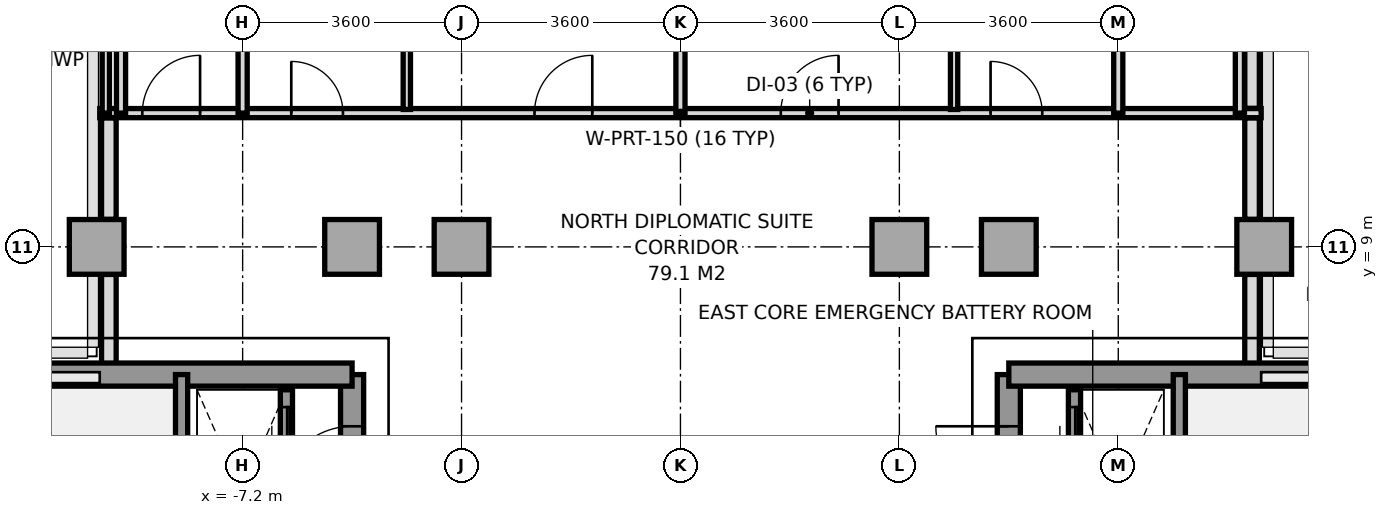
"""IFC4 building model, lengths in metres.
Left out: names, types, materials, properties, quantities, classifications, styles, units other than length and angle.
Written with IfcOpenShell. Run it as: python <this file> out.ifc"""

import sys

from ifc_helpers import new_model, si_unit, direction, frame, frame_2d, origin, origin_2d, place, context, subcontext, project, spatial, rectangle, extrude, source, transform, mapped, element, fill, save


model = new_model("IFC4")
c1 = context("Model", 3, precision=1e-05, world=origin(), true_north=direction((0.0, 1.0)))
c2 = subcontext(c1, "Body", "Model", "MODEL_VIEW")
j1 = project(units=[si_unit("LENGTHUNIT", "METRE"), si_unit("PLANEANGLEUNIT", "RADIAN")], contexts=[c1])
p1 = place(None, origin())
s1 = spatial("IfcSite", under=j1, at=p1, CompositionType="ELEMENT")
p2 = place(p1, origin())
s2 = spatial("IfcBuilding", under=s1, at=p2, CompositionType="ELEMENT")
p3 = place(p2, frame((0.0, 0.0, 194.4)))
s3 = spatial("IfcBuildingStorey", under=s2, at=p3, CompositionType="ELEMENT", Elevation=194.4)
m1 = source(origin(), c2, "Body", "SweptSolid", [
    extrude(rectangle(XDim=0.9, YDim=0.9, at=origin_2d()), origin(), (0.0, 0.0, 1.0), 3.2),
])
for number, where, z_axis, x_axis in (
    (1, (-9.6, 9.0, 0.0), (0.0, 0.0, 1.0), (1.0, 0.0, 0.0)),
    (2, (-5.4, 9.0, 0.0), (0.0, 0.0, 1.0), (1.0, 0.0, 0.0)),
    (3, (-3.6, 9.0, 0.0), (0.0, 0.0, 1.0), (1.0, 0.0, 0.0)),
    (4, (3.6, 9.0, 0.0), (0.0, 0.0, 1.0), (1.0, 0.0, 0.0)),
    (5, (5.4, 9.0, 0.0), (0.0, 0.0, 1.0), (1.0, 0.0, 0.0)),
    (6, (9.6, 9.0, 0.0), (0.0, 0.0, 1.0), (1.0, 0.0, 0.0)),
):
    element("IfcColumn", number, at=place(p3, frame(where, z_axis=z_axis, x_axis=x_axis)), inside=s3, PredefinedType="COLUMN", context=c2, shape_type="MappedRepresentation", body=[
        mapped(m1, transform((0.0, 0.0, 0.0), x_axis=(1.0, 0.0, 0.0), y_axis=(0.0, 1.0, 0.0), z_axis=(0.0, 0.0, 1.0), scale=1.0)),
    ])
p4 = place(p3, frame((-9.4, 6.953, 0.0), z_axis=(0.0, 0.0, 1.0), x_axis=(0.0, 1.0, 0.0)))
e7 = element("IfcWall", 7, at=p4, inside=s3, PredefinedType="PARAPET", context=c2, shape_type="SweptSolid", body=[
    extrude(rectangle(XDim=1.594, YDim=0.24, at=frame_2d((0.797, 0.0))), origin(), (0.0, 0.0, 1.0), 1.15),
])
p5 = place(p3, frame((-9.4, 9.453, 0.0), z_axis=(0.0, 0.0, 1.0), x_axis=(0.0, 1.0, 0.0)))
e8 = element("IfcWall", 8, at=p5, inside=s3, PredefinedType="PARAPET", context=c2, shape_type="SweptSolid", body=[
    extrude(rectangle(XDim=1.669, YDim=0.24, at=frame_2d((0.834, 0.0))), origin(), (0.0, 0.0, 1.0), 1.15),
])
p6 = place(p3, frame((9.4, 15.358, 0.0), z_axis=(0.0, 0.0, 1.0), x_axis=(0.0, -1.0, 0.0)))
e9 = element("IfcWall", 9, at=p6, inside=s3, PredefinedType="PARAPET", context=c2, shape_type="SweptSolid", body=[
    extrude(rectangle(XDim=4.08, YDim=0.24, at=frame_2d((2.04, 0.0))), origin(), (0.0, 0.0, 1.0), 1.15),
])
p7 = place(p3, frame((9.4, 11.122, 0.0), z_axis=(0.0, 0.0, 1.0), x_axis=(0.0, -1.0, 0.0)))
e10 = element("IfcWall", 10, at=p7, inside=s3, PredefinedType="PARAPET", context=c2, shape_type="SweptSolid", body=[
    extrude(rectangle(XDim=1.669, YDim=0.24, at=frame_2d((0.834, 0.0))), origin(), (0.0, 0.0, 1.0), 1.15),
])
p8 = place(p3, frame((9.4, 8.547, 0.0), z_axis=(0.0, 0.0, 1.0), x_axis=(0.0, -1.0, 0.0)))
e11 = element("IfcWall", 11, at=p8, inside=s3, PredefinedType="PARAPET", context=c2, shape_type="SweptSolid", body=[
    extrude(rectangle(XDim=1.594, YDim=0.24, at=frame_2d((0.797, 0.0))), origin(), (0.0, 0.0, 1.0), 1.15),
])
p9 = place(p3, frame((-5.4, -5.6, 0.0), z_axis=(0.0, 0.0, 1.0), x_axis=(0.0, 1.0, 0.0)))
e12 = element("IfcWall", 12, at=p9, inside=s3, PredefinedType="SHEAR", context=c2, shape_type="SweptSolid", body=[
    extrude(rectangle(XDim=12.5, YDim=0.38, at=frame_2d((6.25, 0.0))), origin(), (0.0, 0.0, 1.0), 3.2),
])
p10 = place(p9, frame((4.55, 0.0, 0.0)))
e13 = element("IfcOpeningElement", 13, at=p10, cuts=e12, PredefinedType="OPENING", context=c2, shape_type="SweptSolid", body=[
    extrude(rectangle(XDim=1.2, YDim=2.2, at=frame_2d((0.6, 1.1))), frame((0.0, 0.2, 0.0), z_axis=(0.0, -1.0, 0.0), x_axis=(1.0, 0.0, 0.0)), (0.0, 0.0, 1.0), 0.4),
])
p11 = place(p9, frame((10.45, 0.0, 0.0)))
e14 = element("IfcOpeningElement", 14, at=p11, cuts=e12, PredefinedType="OPENING", context=c2, shape_type="SweptSolid", body=[
    extrude(rectangle(XDim=1.2, YDim=2.2, at=frame_2d((0.6, 1.1))), frame((0.0, 0.2, 0.0), z_axis=(0.0, -1.0, 0.0), x_axis=(1.0, 0.0, 0.0)), (0.0, 0.0, 1.0), 0.4),
])
p12 = place(p3, frame((-11.356, 6.9, 0.0), z_axis=(0.0, 0.0, 1.0), x_axis=(1.0, 0.0, 0.0)))
e15 = element("IfcWall", 15, at=p12, inside=s3, PredefinedType="SHEAR", context=c2, shape_type="SweptSolid", body=[
    extrude(rectangle(XDim=5.956, YDim=0.38, at=frame_2d((2.978, 0.0))), origin(), (0.0, 0.0, 1.0), 3.2),
])
p13 = place(p3, frame((-8.204, -0.016, 0.0), z_axis=(0.0, 0.0, 1.0), x_axis=(0.0, 1.0, 0.0)))
e16 = element("IfcWall", 16, at=p13, inside=s3, PredefinedType="SOLIDWALL", context=c2, shape_type="SweptSolid", body=[
    extrude(rectangle(XDim=6.916, YDim=0.2, at=frame_2d((3.458, 0.0))), origin(), (0.0, 0.0, 1.0), 3.2),
])
p14 = place(p13, frame((0.2, 0.0, 0.0)))
e17 = element("IfcOpeningElement", 17, at=p14, cuts=e16, PredefinedType="OPENING", context=c2, shape_type="SweptSolid", body=[
    extrude(rectangle(XDim=1.2, YDim=2.2, at=frame_2d((0.6, 1.1))), frame((0.0, 0.11, 0.0), z_axis=(0.0, -1.0, 0.0), x_axis=(1.0, 0.0, 0.0)), (0.0, 0.0, 1.0), 0.22),
])
p15 = place(p3, frame((5.4, -5.6, 0.0), z_axis=(0.0, 0.0, 1.0), x_axis=(0.0, 1.0, 0.0)))
e18 = element("IfcWall", 18, at=p15, inside=s3, PredefinedType="SHEAR", context=c2, shape_type="SweptSolid", body=[
    extrude(rectangle(XDim=12.5, YDim=0.38, at=frame_2d((6.25, 0.0))), origin(), (0.0, 0.0, 1.0), 3.2),
])
p16 = place(p15, frame((4.55, 0.0, 0.0)))
e19 = element("IfcOpeningElement", 19, at=p16, cuts=e18, PredefinedType="OPENING", context=c2, shape_type="SweptSolid", body=[
    extrude(rectangle(XDim=1.2, YDim=2.2, at=frame_2d((0.6, 1.1))), frame((0.0, 0.2, 0.0), z_axis=(0.0, -1.0, 0.0), x_axis=(1.0, 0.0, 0.0)), (0.0, 0.0, 1.0), 0.4),
])
p17 = place(p15, frame((10.45, 0.0, 0.0)))
e20 = element("IfcOpeningElement", 20, at=p17, cuts=e18, PredefinedType="OPENING", context=c2, shape_type="SweptSolid", body=[
    extrude(rectangle(XDim=1.2, YDim=2.2, at=frame_2d((0.6, 1.1))), frame((0.0, 0.2, 0.0), z_axis=(0.0, -1.0, 0.0), x_axis=(1.0, 0.0, 0.0)), (0.0, 0.0, 1.0), 0.4),
])
p18 = place(p15, frame((7.88, 0.0, 0.0)))
e21 = element("IfcOpeningElement", 21, at=p18, cuts=e18, PredefinedType="OPENING", context=c2, shape_type="SweptSolid", body=[
    extrude(rectangle(XDim=0.8, YDim=2.1, at=frame_2d((0.4, 1.05))), frame((0.0, 0.2, 0.0), z_axis=(0.0, -1.0, 0.0), x_axis=(1.0, 0.0, 0.0)), (0.0, 0.0, 1.0), 0.4),
])
p19 = place(p3, frame((5.4, 6.9, 0.0), z_axis=(0.0, 0.0, 1.0), x_axis=(1.0, 0.0, 0.0)))
e22 = element("IfcWall", 22, at=p19, inside=s3, PredefinedType="SHEAR", context=c2, shape_type="SweptSolid", body=[
    extrude(rectangle(XDim=5.956, YDim=0.38, at=frame_2d((2.978, 0.0))), origin(), (0.0, 0.0, 1.0), 3.2),
])
p20 = place(p3, frame((8.204, -0.016, 0.0), z_axis=(0.0, 0.0, 1.0), x_axis=(0.0, 1.0, 0.0)))
e23 = element("IfcWall", 23, at=p20, inside=s3, PredefinedType="SOLIDWALL", context=c2, shape_type="SweptSolid", body=[
    extrude(rectangle(XDim=6.916, YDim=0.2, at=frame_2d((3.458, 0.0))), origin(), (0.0, 0.0, 1.0), 3.2),
])
p21 = place(p20, frame((0.2, 0.0, 0.0)))
e24 = element("IfcOpeningElement", 24, at=p21, cuts=e23, PredefinedType="OPENING", context=c2, shape_type="SweptSolid", body=[
    extrude(rectangle(XDim=1.2, YDim=2.2, at=frame_2d((0.6, 1.1))), frame((0.0, 0.11, 0.0), z_axis=(0.0, -1.0, 0.0), x_axis=(1.0, 0.0, 0.0)), (0.0, 0.0, 1.0), 0.22),
])
p22 = place(p3, frame((-6.48, 4.98, 0.0), z_axis=(0.0, 0.0, 1.0), x_axis=(0.0, 1.0, 0.0)))
e25 = element("IfcWall", 25, at=p22, inside=s3, PredefinedType="SOLIDWALL", context=c2, shape_type="SweptSolid", body=[
    extrude(rectangle(XDim=1.67, YDim=0.2, at=frame_2d((0.835, 0.0))), origin(), (0.0, 0.0, 1.0), 3.2),
])
p23 = place(p22, frame((0.285, 0.0, 0.0)))
e26 = element("IfcOpeningElement", 26, at=p23, cuts=e25, PredefinedType="OPENING", context=c2, shape_type="SweptSolid", body=[
    extrude(rectangle(XDim=1.1, YDim=2.2, at=frame_2d((0.55, 1.1))), frame((0.0, 0.11, 0.0), z_axis=(0.0, -1.0, 0.0), x_axis=(1.0, 0.0, 0.0)), (0.0, 0.0, 1.0), 0.22),
])
p24 = place(p3, frame((6.48, 4.98, 0.0), z_axis=(0.0, 0.0, 1.0), x_axis=(0.0, 1.0, 0.0)))
e27 = element("IfcWall", 27, at=p24, inside=s3, PredefinedType="SOLIDWALL", context=c2, shape_type="SweptSolid", body=[
    extrude(rectangle(XDim=1.67, YDim=0.2, at=frame_2d((0.835, 0.0))), origin(), (0.0, 0.0, 1.0), 3.2),
])
p25 = place(p24, frame((0.285, 0.0, 0.0)))
e28 = element("IfcOpeningElement", 28, at=p25, cuts=e27, PredefinedType="OPENING", context=c2, shape_type="SweptSolid", body=[
    extrude(rectangle(XDim=1.1, YDim=2.2, at=frame_2d((0.55, 1.1))), frame((0.0, 0.11, 0.0), z_axis=(0.0, -1.0, 0.0), x_axis=(1.0, 0.0, 0.0)), (0.0, 0.0, 1.0), 0.22),
])
p26 = place(p3, frame((-9.55, 11.2, 0.0), z_axis=(0.0, 0.0, 1.0), x_axis=(1.0, 0.0, 0.0)))
e29 = element("IfcWall", 29, at=p26, inside=s3, PredefinedType="PARTITIONING", context=c2, shape_type="SweptSolid", body=[
    extrude(rectangle(XDim=19.1, YDim=0.15, at=frame_2d((9.55, 0.0))), origin(), (0.0, 0.0, 1.0), 3.2),
])
p27 = place(p26, frame((0.7, 0.0, 0.0)))
e30 = element("IfcOpeningElement", 30, at=p27, cuts=e29, PredefinedType="OPENING", context=c2, shape_type="SweptSolid", body=[
    extrude(rectangle(XDim=0.95, YDim=2.15, at=frame_2d((0.475, 1.075))), frame((0.0, 0.085, 0.0), z_axis=(0.0, -1.0, 0.0), x_axis=(1.0, 0.0, 0.0)), (0.0, 0.0, 1.0), 0.17),
])
p28 = place(p26, frame((3.15, 0.0, 0.0)))
e31 = element("IfcOpeningElement", 31, at=p28, cuts=e29, PredefinedType="OPENING", context=c2, shape_type="SweptSolid", body=[
    extrude(rectangle(XDim=0.85, YDim=2.1, at=frame_2d((0.425, 1.05))), frame((0.0, 0.085, 0.0), z_axis=(0.0, -1.0, 0.0), x_axis=(1.0, 0.0, 0.0)), (0.0, 0.0, 1.0), 0.17),
])
p29 = place(p26, frame((7.15, 0.0, 0.0)))
e32 = element("IfcOpeningElement", 32, at=p29, cuts=e29, PredefinedType="OPENING", context=c2, shape_type="SweptSolid", body=[
    extrude(rectangle(XDim=0.95, YDim=2.15, at=frame_2d((0.475, 1.075))), frame((0.0, 0.085, 0.0), z_axis=(0.0, -1.0, 0.0), x_axis=(1.0, 0.0, 0.0)), (0.0, 0.0, 1.0), 0.17),
])
p30 = place(p26, frame((14.65, 0.0, 0.0)))
e33 = element("IfcOpeningElement", 33, at=p30, cuts=e29, PredefinedType="OPENING", context=c2, shape_type="SweptSolid", body=[
    extrude(rectangle(XDim=0.85, YDim=2.1, at=frame_2d((0.425, 1.05))), frame((0.0, 0.085, 0.0), z_axis=(0.0, -1.0, 0.0), x_axis=(1.0, 0.0, 0.0)), (0.0, 0.0, 1.0), 0.17),
])
p31 = place(p26, frame((11.2, 0.0, 0.0)))
e34 = element("IfcOpeningElement", 34, at=p31, cuts=e29, PredefinedType="OPENING", context=c2, shape_type="SweptSolid", body=[
    extrude(rectangle(XDim=0.95, YDim=2.15, at=frame_2d((0.475, 1.075))), frame((0.0, 0.085, 0.0), z_axis=(0.0, -1.0, 0.0), x_axis=(1.0, 0.0, 0.0)), (0.0, 0.0, 1.0), 0.17),
])
for number, where, z_axis, x_axis in (
    (35, (-9.2, 11.2, 0.0), (0.0, 0.0, 1.0), (0.0, 1.0, 0.0)),
    (36, (9.2, 11.2, 0.0), (0.0, 0.0, 1.0), (0.0, 1.0, 0.0)),
):
    element("IfcWall", number, at=place(p3, frame(where, z_axis=z_axis, x_axis=x_axis)), inside=s3, PredefinedType="PARTITIONING", context=c2, shape_type="SweptSolid", body=[
        extrude(rectangle(XDim=4.48, YDim=0.15, at=frame_2d((2.24, 0.0))), origin(), (0.0, 0.0, 1.0), 3.2),
    ])
p32 = place(p3, frame((-7.2, 11.2, 0.0), z_axis=(0.0, 0.0, 1.0), x_axis=(0.0, 1.0, 0.0)))
e37 = element("IfcWall", 37, at=p32, inside=s3, PredefinedType="PARTITIONING", context=c2, shape_type="SweptSolid", body=[
    extrude(rectangle(XDim=12.2, YDim=0.15, at=frame_2d((6.1, 0.0))), origin(), (0.0, 0.0, 1.0), 2.75),
])
p33 = place(p3, frame((0.0, 11.2, 0.0), z_axis=(0.0, 0.0, 1.0), x_axis=(0.0, 1.0, 0.0)))
e38 = element("IfcWall", 38, at=p33, inside=s3, PredefinedType="PARTITIONING", context=c2, shape_type="SweptSolid", body=[
    extrude(rectangle(XDim=13.45, YDim=0.15, at=frame_2d((6.725, 0.0))), origin(), (0.0, 0.0, 1.0), 2.75),
])
p34 = place(p3, frame((7.2, 11.2, 0.0), z_axis=(0.0, 0.0, 1.0), x_axis=(0.0, 1.0, 0.0)))
e39 = element("IfcWall", 39, at=p34, inside=s3, PredefinedType="PARTITIONING", context=c2, shape_type="SweptSolid", body=[
    extrude(rectangle(XDim=12.2, YDim=0.15, at=frame_2d((6.1, 0.0))), origin(), (0.0, 0.0, 1.0), 2.75),
])
p35 = place(p3, frame((-9.45, 11.2, 0.0), z_axis=(0.0, 0.0, 1.0), x_axis=(0.0, 1.0, 0.0)))
e40 = element("IfcWall", 40, at=p35, inside=s3, PredefinedType="PARTITIONING", context=c2, shape_type="SweptSolid", body=[
    extrude(rectangle(XDim=3.6, YDim=0.12, at=frame_2d((1.8, 0.0))), origin(), (0.0, 0.0, 1.0), 3.2),
])
for number, where, z_axis, x_axis in (
    (41, (-4.5, 11.26, 0.0), (0.0, 0.0, 1.0), (0.0, 1.0, 0.0)),
    (42, (4.5, 11.26, 0.0), (0.0, 0.0, 1.0), (0.0, 1.0, 0.0)),
):
    element("IfcWall", number, at=place(p3, frame(where, z_axis=z_axis, x_axis=x_axis)), inside=s3, PredefinedType="PARTITIONING", context=c2, shape_type="SweptSolid", body=[
        extrude(rectangle(XDim=3.1, YDim=0.12, at=frame_2d((1.55, 0.0))), origin(), (0.0, 0.0, 1.0), 2.75),
    ])
m2 = source(origin(), c2, "Body", "SweptSolid", [
    extrude(rectangle(XDim=1.2, YDim=2.2, at=frame_2d((0.6, 1.1))), frame((0.0, 0.025, 0.0), z_axis=(0.0, -1.0, 0.0), x_axis=(1.0, 0.0, 0.0)), (0.0, 0.0, 1.0), 0.05),
])
p36 = place(p11, origin())
e43 = element("IfcDoor", 43, at=p36, inside=s3, OperationType="SINGLE_SWING_LEFT", PredefinedType="DOOR", context=c2, shape_type="MappedRepresentation", body=[
    mapped(m2, transform((0.0, 0.0, 0.0), x_axis=(1.0, 0.0, 0.0), y_axis=(0.0, 1.0, 0.0), z_axis=(0.0, 0.0, 1.0), scale=1.0)),
])
fill(e14, e43)
p37 = place(p17, origin())
e44 = element("IfcDoor", 44, at=p37, inside=s3, OperationType="SINGLE_SWING_RIGHT", PredefinedType="DOOR", context=c2, shape_type="MappedRepresentation", body=[
    mapped(m2, transform((0.0, 0.0, 0.0), x_axis=(1.0, 0.0, 0.0), y_axis=(0.0, 1.0, 0.0), z_axis=(0.0, 0.0, 1.0), scale=1.0)),
])
fill(e20, e44)
m3 = source(origin(), c2, "Body", "SweptSolid", [
    extrude(rectangle(XDim=1.1, YDim=2.2, at=frame_2d((0.55, 1.1))), frame((0.0, 0.025, 0.0), z_axis=(0.0, -1.0, 0.0), x_axis=(1.0, 0.0, 0.0)), (0.0, 0.0, 1.0), 0.05),
])
p38 = place(p23, origin())
e45 = element("IfcDoor", 45, at=p38, inside=s3, OperationType="SLIDING_TO_LEFT", PredefinedType="DOOR", context=c2, shape_type="MappedRepresentation", body=[
    mapped(m3, transform((0.0, 0.0, 0.0), x_axis=(1.0, 0.0, 0.0), y_axis=(0.0, 1.0, 0.0), z_axis=(0.0, 0.0, 1.0), scale=1.0)),
])
fill(e26, e45)
p39 = place(p25, origin())
e46 = element("IfcDoor", 46, at=p39, inside=s3, OperationType="SLIDING_TO_LEFT", PredefinedType="DOOR", context=c2, shape_type="MappedRepresentation", body=[
    mapped(m3, transform((0.0, 0.0, 0.0), x_axis=(1.0, 0.0, 0.0), y_axis=(0.0, 1.0, 0.0), z_axis=(0.0, 0.0, 1.0), scale=1.0)),
])
fill(e28, e46)
m4 = source(origin(), c2, "Body", "SweptSolid", [
    extrude(rectangle(XDim=0.95, YDim=2.15, at=frame_2d((0.475, 1.075))), frame((0.0, 0.025, 0.0), z_axis=(0.0, -1.0, 0.0), x_axis=(1.0, 0.0, 0.0)), (0.0, 0.0, 1.0), 0.05),
])
p40 = place(p27, origin())
e47 = element("IfcDoor", 47, at=p40, inside=s3, OperationType="SINGLE_SWING_RIGHT", PredefinedType="DOOR", context=c2, shape_type="MappedRepresentation", body=[
    mapped(m4, transform((0.0, 0.0, 0.0), x_axis=(1.0, 0.0, 0.0), y_axis=(0.0, 1.0, 0.0), z_axis=(0.0, 0.0, 1.0), scale=1.0)),
])
fill(e30, e47)
m5 = source(origin(), c2, "Body", "SweptSolid", [
    extrude(rectangle(XDim=0.85, YDim=2.1, at=frame_2d((0.425, 1.05))), frame((0.0, 0.025, 0.0), z_axis=(0.0, -1.0, 0.0), x_axis=(1.0, 0.0, 0.0)), (0.0, 0.0, 1.0), 0.05),
])
p41 = place(p28, origin())
e48 = element("IfcDoor", 48, at=p41, inside=s3, OperationType="SINGLE_SWING_LEFT", PredefinedType="DOOR", context=c2, shape_type="MappedRepresentation", body=[
    mapped(m5, transform((0.0, 0.0, 0.0), x_axis=(1.0, 0.0, 0.0), y_axis=(0.0, 1.0, 0.0), z_axis=(0.0, 0.0, 1.0), scale=1.0)),
])
fill(e31, e48)
p42 = place(p29, origin())
e49 = element("IfcDoor", 49, at=p42, inside=s3, OperationType="SINGLE_SWING_RIGHT", PredefinedType="DOOR", context=c2, shape_type="MappedRepresentation", body=[
    mapped(m4, transform((0.0, 0.0, 0.0), x_axis=(1.0, 0.0, 0.0), y_axis=(0.0, 1.0, 0.0), z_axis=(0.0, 0.0, 1.0), scale=1.0)),
])
fill(e32, e49)
p43 = place(p30, origin())
e50 = element("IfcDoor", 50, at=p43, inside=s3, OperationType="SINGLE_SWING_LEFT", PredefinedType="DOOR", context=c2, shape_type="MappedRepresentation", body=[
    mapped(m5, transform((0.0, 0.0, 0.0), x_axis=(1.0, 0.0, 0.0), y_axis=(0.0, 1.0, 0.0), z_axis=(0.0, 0.0, 1.0), scale=1.0)),
])
fill(e33, e50)
p44 = place(p31, origin())
e51 = element("IfcDoor", 51, at=p44, inside=s3, OperationType="SINGLE_SWING_RIGHT", PredefinedType="DOOR", context=c2, shape_type="MappedRepresentation", body=[
    mapped(m4, transform((0.0, 0.0, 0.0), x_axis=(1.0, 0.0, 0.0), y_axis=(0.0, 1.0, 0.0), z_axis=(0.0, 0.0, 1.0), scale=1.0)),
])
fill(e34, e51)
save(model, sys.argv[1])
